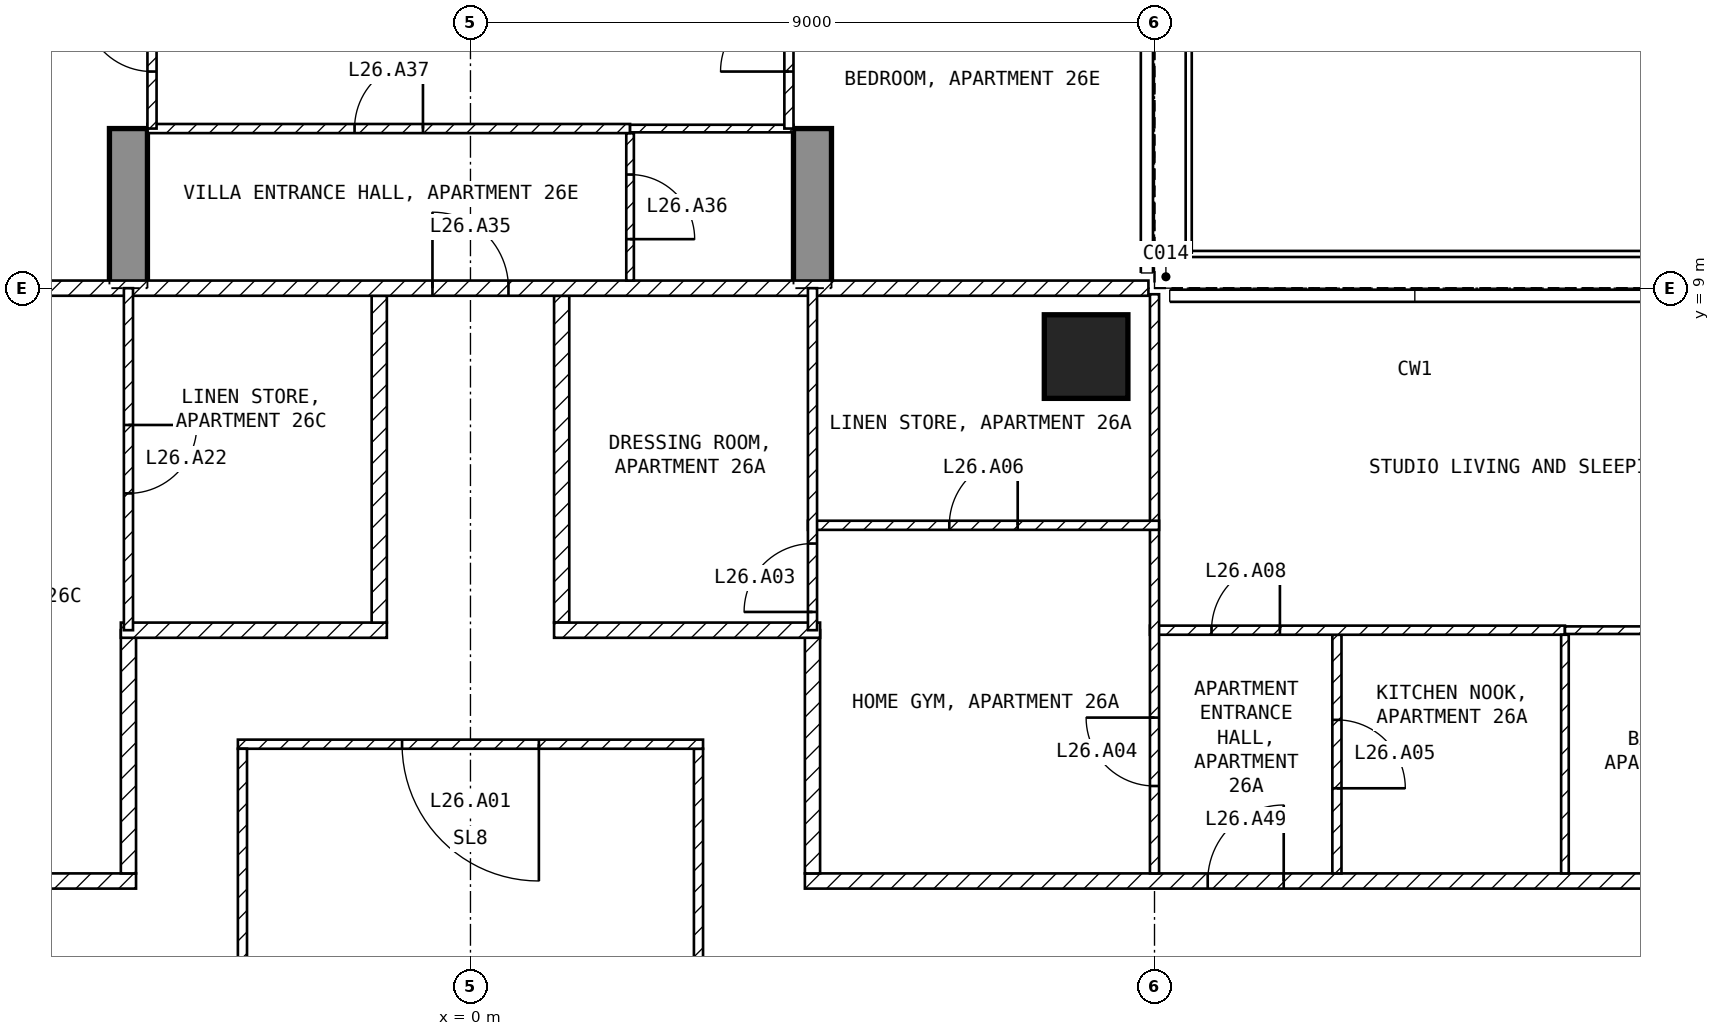
"""IFC4 building model, lengths in metres.
Left out: names, types, materials, properties, quantities, classifications, styles, units other than length and angle.
Written with IfcOpenShell. Run it as: python <this file> out.ifc"""

import sys

from ifc_helpers import new_model, si_unit, direction, frame, frame_2d, origin, origin_2d, place, context, subcontext, project, spatial, polyline, rectangle, outline, extrude, element, fill, save


model = new_model("IFC4")
c1 = context("Model", 3, precision=1e-05, world=origin(), true_north=direction((0.0, 1.0)))
c2 = subcontext(c1, "Body", "Model", "MODEL_VIEW")
j1 = project(units=[si_unit("LENGTHUNIT", "METRE"), si_unit("PLANEANGLEUNIT", "RADIAN")], contexts=[c1])
p1 = place(None, origin())
s1 = spatial("IfcSite", under=j1, at=p1, CompositionType="ELEMENT")
p2 = place(p1, origin())
s2 = spatial("IfcBuilding", under=s1, at=p2, CompositionType="ELEMENT")
p3 = place(p2, frame((0.0, 0.0, 112.9)))
s3 = spatial("IfcBuildingStorey", under=s2, at=p3, CompositionType="ELEMENT", Elevation=112.9)
p4 = place(p3, frame((8.1, 8.1, -0.25), z_axis=(0.0, 0.0, 1.0), x_axis=(1.0, 0.0, 0.0)))
e1 = element("IfcColumn", 1, at=p4, inside=s3, PredefinedType="COLUMN", context=c2, shape_type="SweptSolid", body=[
    extrude(rectangle(XDim=1.1, YDim=1.1, at=origin_2d()), origin(), (0.0, 0.0, 1.0), 3.5),
])
for number, where, z_axis, x_axis in (
    (2, (-4.75, 9.0, -0.25), (1.0, 0.0, 0.0), (0.0, 1.0, 0.0)),
    (3, (4.25, 9.0, -0.25), (1.0, 0.0, 0.0), (0.0, 1.0, 0.0)),
):
    element("IfcWall", number, at=place(p3, frame(where, z_axis=z_axis, x_axis=x_axis)), inside=s3, PredefinedType="SHEAR", context=c2, shape_type="SweptSolid", body=[
        extrude(outline(polyline([(0.0, 0.0), (2.1, 0.0), (2.1, 2.65), (4.5, 2.65), (4.5, 0.0), (9.9, 0.0), (9.9, 2.65), (12.3, 2.65), (12.3, 0.0), (16.55, 0.0), (16.55, 3.5), (0.0, 3.5), (0.0, 0.0)])), origin(), (0.0, 0.0, 1.0), 0.5),
    ])
p5 = place(p3, frame((3.0, -2.94, 0.0), z_axis=(0.0, 0.0, 1.0), x_axis=(0.0, 1.0, 0.0)))
e4 = element("IfcWall", 4, at=p5, inside=s3, PredefinedType="PARTITIONING", context=c2, shape_type="SweptSolid", body=[
    extrude(rectangle(XDim=5.88, YDim=0.12, at=frame_2d((2.94, 0.0))), origin(), (0.0, 0.0, 1.0), 3.25),
])
p6 = place(p3, frame((3.06, 3.0, 0.0), z_axis=(0.0, 0.0, 1.0), x_axis=(-1.0, 0.0, 0.0)))
e5 = element("IfcWall", 5, at=p6, inside=s3, PredefinedType="PARTITIONING", context=c2, shape_type="SweptSolid", body=[
    extrude(rectangle(XDim=6.12, YDim=0.12, at=frame_2d((3.06, 0.0))), origin(), (0.0, 0.0, 1.0), 3.25),
])
p7 = place(p6, frame((2.16, 0.0, 0.0)))
e6 = element("IfcOpeningElement", 6, at=p7, cuts=e5, PredefinedType="OPENING", context=c2, shape_type="SweptSolid", body=[
    extrude(rectangle(XDim=1.8, YDim=2.1, at=frame_2d((0.9, 1.05))), frame((0.0, 0.07, 0.0), z_axis=(0.0, -1.0, 0.0), x_axis=(1.0, 0.0, 0.0)), (0.0, 0.0, 1.0), 0.14),
])
p8 = place(p3, frame((-3.0, 2.94, 0.0), z_axis=(0.0, 0.0, 1.0), x_axis=(0.0, -1.0, 0.0)))
e7 = element("IfcWall", 7, at=p8, inside=s3, PredefinedType="PARTITIONING", context=c2, shape_type="SweptSolid", body=[
    extrude(rectangle(XDim=5.88, YDim=0.12, at=frame_2d((2.94, 0.0))), origin(), (0.0, 0.0, 1.0), 3.25),
])
p9 = place(p3, frame((4.4, 1.2, 0.0), z_axis=(0.0, 0.0, 1.0), x_axis=(1.0, 0.0, 0.0)))
e8 = element("IfcWall", 8, at=p9, inside=s3, PredefinedType="PARTITIONING", context=c2, shape_type="SweptSolid", body=[
    extrude(rectangle(XDim=17.2, YDim=0.2, at=frame_2d((8.6, 0.0))), origin(), (0.0, 0.0, 1.0), 3.25),
])
p10 = place(p9, frame((5.3, 0.0, 0.0)))
e9 = element("IfcOpeningElement", 9, at=p10, cuts=e8, PredefinedType="OPENING", context=c2, shape_type="SweptSolid", body=[
    extrude(rectangle(XDim=1.0, YDim=2.1, at=frame_2d((0.5, 1.05))), frame((0.0, 0.11, 0.0), z_axis=(0.0, -1.0, 0.0), x_axis=(1.0, 0.0, 0.0)), (0.0, 0.0, 1.0), 0.22),
])
p11 = place(p3, frame((4.5, 4.5, 0.0), z_axis=(0.0, 0.0, 1.0), x_axis=(0.0, -1.0, 0.0)))
e10 = element("IfcWall", 10, at=p11, inside=s3, PredefinedType="PARTITIONING", context=c2, shape_type="SweptSolid", body=[
    extrude(rectangle(XDim=3.2, YDim=0.2, at=frame_2d((1.6, 0.0))), origin(), (0.0, 0.0, 1.0), 3.25),
])
p12 = place(p3, frame((1.2, 8.9, 0.0), z_axis=(0.0, 0.0, 1.0), x_axis=(0.0, -1.0, 0.0)))
e11 = element("IfcWall", 11, at=p12, inside=s3, PredefinedType="PARTITIONING", context=c2, shape_type="SweptSolid", body=[
    extrude(rectangle(XDim=4.3, YDim=0.2, at=frame_2d((2.15, 0.0))), origin(), (0.0, 0.0, 1.0), 3.25),
])
p13 = place(p3, frame((1.1, 4.5, 0.0), z_axis=(0.0, 0.0, 1.0), x_axis=(1.0, 0.0, 0.0)))
e12 = element("IfcWall", 12, at=p13, inside=s3, PredefinedType="PARTITIONING", context=c2, shape_type="SweptSolid", body=[
    extrude(rectangle(XDim=3.5, YDim=0.2, at=frame_2d((1.75, 0.0))), origin(), (0.0, 0.0, 1.0), 3.25),
])
p14 = place(p3, frame((-21.6, 1.2, 0.0), z_axis=(0.0, 0.0, 1.0), x_axis=(1.0, 0.0, 0.0)))
e13 = element("IfcWall", 13, at=p14, inside=s3, PredefinedType="PARTITIONING", context=c2, shape_type="SweptSolid", body=[
    extrude(rectangle(XDim=17.2, YDim=0.2, at=frame_2d((8.6, 0.0))), origin(), (0.0, 0.0, 1.0), 3.25),
])
p15 = place(p14, frame((4.3, 0.0, 0.0)))
e14 = element("IfcOpeningElement", 14, at=p15, cuts=e13, PredefinedType="OPENING", context=c2, shape_type="SweptSolid", body=[
    extrude(rectangle(XDim=1.0, YDim=2.1, at=frame_2d((0.5, 1.05))), frame((0.0, 0.11, 0.0), z_axis=(0.0, -1.0, 0.0), x_axis=(1.0, 0.0, 0.0)), (0.0, 0.0, 1.0), 0.22),
])
p16 = place(p3, frame((-4.5, 1.3, 0.0), z_axis=(0.0, 0.0, 1.0), x_axis=(0.0, 1.0, 0.0)))
e15 = element("IfcWall", 15, at=p16, inside=s3, PredefinedType="PARTITIONING", context=c2, shape_type="SweptSolid", body=[
    extrude(rectangle(XDim=3.2, YDim=0.2, at=frame_2d((1.6, 0.0))), origin(), (0.0, 0.0, 1.0), 3.25),
])
p17 = place(p3, frame((-4.6, 4.5, 0.0), z_axis=(0.0, 0.0, 1.0), x_axis=(1.0, 0.0, 0.0)))
e16 = element("IfcWall", 16, at=p17, inside=s3, PredefinedType="PARTITIONING", context=c2, shape_type="SweptSolid", body=[
    extrude(rectangle(XDim=3.5, YDim=0.2, at=frame_2d((1.75, 0.0))), origin(), (0.0, 0.0, 1.0), 3.25),
])
p18 = place(p3, frame((-1.2, 4.6, 0.0), z_axis=(0.0, 0.0, 1.0), x_axis=(0.0, 1.0, 0.0)))
e17 = element("IfcWall", 17, at=p18, inside=s3, PredefinedType="PARTITIONING", context=c2, shape_type="SweptSolid", body=[
    extrude(rectangle(XDim=4.3, YDim=0.2, at=frame_2d((2.15, 0.0))), origin(), (0.0, 0.0, 1.0), 3.25),
])
p19 = place(p3, frame((-8.92, 9.0, 0.0), z_axis=(0.0, 0.0, 1.0), x_axis=(1.0, 0.0, 0.0)))
e18 = element("IfcWall", 18, at=p19, inside=s3, PredefinedType="PARTITIONING", context=c2, shape_type="SweptSolid", body=[
    extrude(rectangle(XDim=17.84, YDim=0.2, at=frame_2d((8.92, 0.0))), origin(), (0.0, 0.0, 1.0), 3.25),
])
p20 = place(p19, frame((8.42, 0.0, 0.0)))
e19 = element("IfcOpeningElement", 19, at=p20, cuts=e18, PredefinedType="OPENING", context=c2, shape_type="SweptSolid", body=[
    extrude(rectangle(XDim=1.0, YDim=2.1, at=frame_2d((0.5, 1.05))), frame((0.0, 0.11, 0.0), z_axis=(0.0, -1.0, 0.0), x_axis=(1.0, 0.0, 0.0)), (0.0, 0.0, 1.0), 0.22),
])
p21 = place(p3, frame((11.4, 4.44, 0.0), z_axis=(0.0, 0.0, 1.0), x_axis=(0.0, -1.0, 0.0)))
e20 = element("IfcWall", 20, at=p21, inside=s3, PredefinedType="PARTITIONING", context=c2, shape_type="SweptSolid", body=[
    extrude(rectangle(XDim=3.14, YDim=0.12, at=frame_2d((1.57, 0.0))), origin(), (0.0, 0.0, 1.0), 3.25),
])
p22 = place(p21, frame((1.12, 0.0, 0.0)))
e21 = element("IfcOpeningElement", 21, at=p22, cuts=e20, PredefinedType="OPENING", context=c2, shape_type="SweptSolid", body=[
    extrude(rectangle(XDim=0.9, YDim=2.1, at=frame_2d((0.45, 1.05))), frame((0.0, 0.07, 0.0), z_axis=(0.0, -1.0, 0.0), x_axis=(1.0, 0.0, 0.0)), (0.0, 0.0, 1.0), 0.14),
])
p23 = place(p3, frame((8.94, 4.5, 0.0), z_axis=(0.0, 0.0, 1.0), x_axis=(1.0, 0.0, 0.0)))
e22 = element("IfcWall", 22, at=p23, inside=s3, PredefinedType="PARTITIONING", context=c2, shape_type="SweptSolid", body=[
    extrude(rectangle(XDim=5.46, YDim=0.12, at=frame_2d((2.73, 0.0))), origin(), (0.0, 0.0, 1.0), 3.25),
])
p24 = place(p23, frame((0.81, 0.0, 0.0)))
e23 = element("IfcOpeningElement", 23, at=p24, cuts=e22, PredefinedType="OPENING", context=c2, shape_type="SweptSolid", body=[
    extrude(rectangle(XDim=0.9, YDim=2.1, at=frame_2d((0.45, 1.05))), frame((0.0, 0.07, 0.0), z_axis=(0.0, -1.0, 0.0), x_axis=(1.0, 0.0, 0.0)), (0.0, 0.0, 1.0), 0.14),
])
p25 = place(p3, frame((9.0, 1.3, 0.0), z_axis=(0.0, 0.0, 1.0), x_axis=(0.0, 1.0, 0.0)))
e24 = element("IfcWall", 24, at=p25, inside=s3, PredefinedType="PARTITIONING", context=c2, shape_type="SweptSolid", body=[
    extrude(rectangle(XDim=7.62, YDim=0.12, at=frame_2d((3.81, 0.0))), origin(), (0.0, 0.0, 1.0), 3.25),
])
p26 = place(p25, frame((1.15, 0.0, 0.0)))
e25 = element("IfcOpeningElement", 25, at=p26, cuts=e24, PredefinedType="OPENING", context=c2, shape_type="SweptSolid", body=[
    extrude(rectangle(XDim=0.9, YDim=2.1, at=frame_2d((0.45, 1.05))), frame((0.0, 0.07, 0.0), z_axis=(0.0, -1.0, 0.0), x_axis=(1.0, 0.0, 0.0)), (0.0, 0.0, 1.0), 0.14),
])
p27 = place(p3, frame((14.4, 4.44, 0.0), z_axis=(0.0, 0.0, 1.0), x_axis=(0.0, -1.0, 0.0)))
e26 = element("IfcWall", 26, at=p27, inside=s3, PredefinedType="PARTITIONING", context=c2, shape_type="SweptSolid", body=[
    extrude(rectangle(XDim=3.14, YDim=0.1, at=frame_2d((1.57, 0.0))), origin(), (0.0, 0.0, 1.0), 3.25),
])
p28 = place(p3, frame((14.4, 4.5, 0.0), z_axis=(0.0, 0.0, 1.0), x_axis=(1.0, 0.0, 0.0)))
e27 = element("IfcWall", 27, at=p28, inside=s3, PredefinedType="PARTITIONING", context=c2, shape_type="SweptSolid", body=[
    extrude(rectangle(XDim=3.0, YDim=0.1, at=frame_2d((1.5, 0.0))), origin(), (0.0, 0.0, 1.0), 3.25),
])
p29 = place(p28, frame((1.075, 0.0, 0.0)))
e28 = element("IfcOpeningElement", 28, at=p29, cuts=e27, PredefinedType="OPENING", context=c2, shape_type="SweptSolid", body=[
    extrude(rectangle(XDim=0.85, YDim=2.1, at=frame_2d((0.425, 1.05))), frame((0.0, 0.06, 0.0), z_axis=(0.0, -1.0, 0.0), x_axis=(1.0, 0.0, 0.0)), (0.0, 0.0, 1.0), 0.12),
])
p30 = place(p3, frame((4.44, 5.88, 0.0), z_axis=(0.0, 0.0, 1.0), x_axis=(1.0, 0.0, 0.0)))
e29 = element("IfcWall", 29, at=p30, inside=s3, PredefinedType="PARTITIONING", context=c2, shape_type="SweptSolid", body=[
    extrude(rectangle(XDim=4.62, YDim=0.12, at=frame_2d((2.31, 0.0))), origin(), (0.0, 0.0, 1.0), 3.25),
])
p31 = place(p30, frame((1.86, 0.0, 0.0)))
e30 = element("IfcOpeningElement", 30, at=p31, cuts=e29, PredefinedType="OPENING", context=c2, shape_type="SweptSolid", body=[
    extrude(rectangle(XDim=0.9, YDim=2.1, at=frame_2d((0.45, 1.05))), frame((0.0, 0.07, 0.0), z_axis=(0.0, -1.0, 0.0), x_axis=(1.0, 0.0, 0.0)), (0.0, 0.0, 1.0), 0.14),
])
p32 = place(p3, frame((4.5, 4.5, 0.0), z_axis=(0.0, 0.0, 1.0), x_axis=(0.0, 1.0, 0.0)))
e31 = element("IfcWall", 31, at=p32, inside=s3, PredefinedType="PARTITIONING", context=c2, shape_type="SweptSolid", body=[
    extrude(rectangle(XDim=4.5, YDim=0.12, at=frame_2d((2.25, 0.0))), origin(), (0.0, 0.0, 1.0), 3.25),
])
p33 = place(p32, frame((0.24, 0.0, 0.0)))
e32 = element("IfcOpeningElement", 32, at=p33, cuts=e31, PredefinedType="OPENING", context=c2, shape_type="SweptSolid", body=[
    extrude(rectangle(XDim=0.9, YDim=2.1, at=frame_2d((0.45, 1.05))), frame((0.0, 0.07, 0.0), z_axis=(0.0, -1.0, 0.0), x_axis=(1.0, 0.0, 0.0)), (0.0, 0.0, 1.0), 0.14),
])
p34 = place(p3, frame((-4.5, 9.0, 0.0), z_axis=(0.0, 0.0, 1.0), x_axis=(0.0, -1.0, 0.0)))
e33 = element("IfcWall", 33, at=p34, inside=s3, PredefinedType="PARTITIONING", context=c2, shape_type="SweptSolid", body=[
    extrude(rectangle(XDim=4.5, YDim=0.12, at=frame_2d((2.25, 0.0))), origin(), (0.0, 0.0, 1.0), 3.25),
])
p35 = place(p34, frame((1.8, 0.0, 0.0)))
e34 = element("IfcOpeningElement", 34, at=p35, cuts=e33, PredefinedType="OPENING", context=c2, shape_type="SweptSolid", body=[
    extrude(rectangle(XDim=0.9, YDim=2.1, at=frame_2d((0.45, 1.05))), frame((0.0, 0.07, 0.0), z_axis=(0.0, -1.0, 0.0), x_axis=(1.0, 0.0, 0.0)), (0.0, 0.0, 1.0), 0.14),
])
p36 = place(p3, frame((2.1, 11.04, 0.0), z_axis=(0.0, 0.0, 1.0), x_axis=(0.0, -1.0, 0.0)))
e35 = element("IfcWall", 35, at=p36, inside=s3, PredefinedType="PARTITIONING", context=c2, shape_type="SweptSolid", body=[
    extrude(rectangle(XDim=1.94, YDim=0.1, at=frame_2d((0.97, 0.0))), origin(), (0.0, 0.0, 1.0), 3.25),
])
p37 = place(p36, frame((0.545, 0.0, 0.0)))
e36 = element("IfcOpeningElement", 36, at=p37, cuts=e35, PredefinedType="OPENING", context=c2, shape_type="SweptSolid", body=[
    extrude(rectangle(XDim=0.85, YDim=2.1, at=frame_2d((0.425, 1.05))), frame((0.0, 0.06, 0.0), z_axis=(0.0, -1.0, 0.0), x_axis=(1.0, 0.0, 0.0)), (0.0, 0.0, 1.0), 0.12),
])
p38 = place(p3, frame((-4.25, 11.1, 0.0), z_axis=(0.0, 0.0, 1.0), x_axis=(1.0, 0.0, 0.0)))
e37 = element("IfcWall", 37, at=p38, inside=s3, PredefinedType="PARTITIONING", context=c2, shape_type="SweptSolid", body=[
    extrude(rectangle(XDim=6.35, YDim=0.12, at=frame_2d((3.175, 0.0))), origin(), (0.0, 0.0, 1.0), 3.25),
])
p39 = place(p38, frame((2.725, 0.0, 0.0)))
e38 = element("IfcOpeningElement", 38, at=p39, cuts=e37, PredefinedType="OPENING", context=c2, shape_type="SweptSolid", body=[
    extrude(rectangle(XDim=0.9, YDim=2.1, at=frame_2d((0.45, 1.05))), frame((0.0, 0.07, 0.0), z_axis=(0.0, -1.0, 0.0), x_axis=(1.0, 0.0, 0.0)), (0.0, 0.0, 1.0), 0.14),
])
p40 = place(p3, frame((2.1, 11.1, 0.0), z_axis=(0.0, 0.0, 1.0), x_axis=(1.0, 0.0, 0.0)))
e39 = element("IfcWall", 39, at=p40, inside=s3, PredefinedType="PARTITIONING", context=c2, shape_type="SweptSolid", body=[
    extrude(rectangle(XDim=2.15, YDim=0.1, at=frame_2d((1.075, 0.0))), origin(), (0.0, 0.0, 1.0), 3.25),
])
p41 = place(p3, frame((4.19, 11.1, 0.0), z_axis=(0.0, 0.0, 1.0), x_axis=(0.0, 1.0, 0.0)))
e40 = element("IfcWall", 40, at=p41, inside=s3, PredefinedType="PARTITIONING", context=c2, shape_type="SweptSolid", body=[
    extrude(rectangle(XDim=2.4, YDim=0.12, at=frame_2d((1.2, 0.0))), origin(), (0.0, 0.0, 1.0), 2.4),
])
p42 = place(p41, frame((0.75, 0.0, 0.0)))
e41 = element("IfcOpeningElement", 41, at=p42, cuts=e40, PredefinedType="OPENING", context=c2, shape_type="SweptSolid", body=[
    extrude(rectangle(XDim=0.9, YDim=2.1, at=frame_2d((0.45, 1.05))), frame((0.0, 0.07, 0.0), z_axis=(0.0, -1.0, 0.0), x_axis=(1.0, 0.0, 0.0)), (0.0, 0.0, 1.0), 0.14),
])
p43 = place(p3, frame((-4.19, 11.1, 0.0), z_axis=(0.0, 0.0, 1.0), x_axis=(0.0, 1.0, 0.0)))
e42 = element("IfcWall", 42, at=p43, inside=s3, PredefinedType="PARTITIONING", context=c2, shape_type="SweptSolid", body=[
    extrude(rectangle(XDim=2.4, YDim=0.12, at=frame_2d((1.2, 0.0))), origin(), (0.0, 0.0, 1.0), 2.4),
])
p44 = place(p43, frame((0.75, 0.0, 0.0)))
e43 = element("IfcOpeningElement", 43, at=p44, cuts=e42, PredefinedType="OPENING", context=c2, shape_type="SweptSolid", body=[
    extrude(rectangle(XDim=0.9, YDim=2.1, at=frame_2d((0.45, 1.05))), frame((0.0, 0.07, 0.0), z_axis=(0.0, -1.0, 0.0), x_axis=(1.0, 0.0, 0.0)), (0.0, 0.0, 1.0), 0.14),
])
p45 = place(p7, origin())
e44 = element("IfcDoor", 44, at=p45, inside=s3, OperationType="SINGLE_SWING_LEFT", PredefinedType="DOOR", context=c2, shape_type="SweptSolid", body=[
    extrude(rectangle(XDim=1.8, YDim=2.1, at=frame_2d((0.9, 1.05))), frame((0.0, 0.025, 0.0), z_axis=(0.0, -1.0, 0.0), x_axis=(1.0, 0.0, 0.0)), (0.0, 0.0, 1.0), 0.05),
])
fill(e6, e44)
p46 = place(p33, origin())
e45 = element("IfcDoor", 45, at=p46, inside=s3, OperationType="SINGLE_SWING_LEFT", PredefinedType="DOOR", context=c2, shape_type="SweptSolid", body=[
    extrude(rectangle(XDim=0.9, YDim=2.1, at=frame_2d((0.45, 1.05))), frame((0.0, 0.025, 0.0), z_axis=(0.0, -1.0, 0.0), x_axis=(1.0, 0.0, 0.0)), (0.0, 0.0, 1.0), 0.05),
])
fill(e32, e45)
p47 = place(p26, origin())
e46 = element("IfcDoor", 46, at=p47, inside=s3, OperationType="SINGLE_SWING_RIGHT", PredefinedType="DOOR", context=c2, shape_type="SweptSolid", body=[
    extrude(rectangle(XDim=0.9, YDim=2.1, at=frame_2d((0.45, 1.05))), frame((0.0, 0.025, 0.0), z_axis=(0.0, -1.0, 0.0), x_axis=(1.0, 0.0, 0.0)), (0.0, 0.0, 1.0), 0.05),
])
fill(e25, e46)
p48 = place(p22, origin())
e47 = element("IfcDoor", 47, at=p48, inside=s3, OperationType="SINGLE_SWING_RIGHT", PredefinedType="DOOR", context=c2, shape_type="SweptSolid", body=[
    extrude(rectangle(XDim=0.9, YDim=2.1, at=frame_2d((0.45, 1.05))), frame((0.0, 0.025, 0.0), z_axis=(0.0, -1.0, 0.0), x_axis=(1.0, 0.0, 0.0)), (0.0, 0.0, 1.0), 0.05),
])
fill(e21, e47)
p49 = place(p31, origin())
e48 = element("IfcDoor", 48, at=p49, inside=s3, OperationType="SINGLE_SWING_RIGHT", PredefinedType="DOOR", context=c2, shape_type="SweptSolid", body=[
    extrude(rectangle(XDim=0.9, YDim=2.1, at=frame_2d((0.45, 1.05))), frame((0.0, 0.025, 0.0), z_axis=(0.0, -1.0, 0.0), x_axis=(1.0, 0.0, 0.0)), (0.0, 0.0, 1.0), 0.05),
])
fill(e30, e48)
p50 = place(p24, origin())
e49 = element("IfcDoor", 49, at=p50, inside=s3, OperationType="SINGLE_SWING_RIGHT", PredefinedType="DOOR", context=c2, shape_type="SweptSolid", body=[
    extrude(rectangle(XDim=0.9, YDim=2.1, at=frame_2d((0.45, 1.05))), frame((0.0, 0.025, 0.0), z_axis=(0.0, -1.0, 0.0), x_axis=(1.0, 0.0, 0.0)), (0.0, 0.0, 1.0), 0.05),
])
fill(e23, e49)
p51 = place(p35, origin())
e50 = element("IfcDoor", 50, at=p51, inside=s3, OperationType="SINGLE_SWING_LEFT", PredefinedType="DOOR", context=c2, shape_type="SweptSolid", body=[
    extrude(rectangle(XDim=0.9, YDim=2.1, at=frame_2d((0.45, 1.05))), frame((0.0, 0.025, 0.0), z_axis=(0.0, -1.0, 0.0), x_axis=(1.0, 0.0, 0.0)), (0.0, 0.0, 1.0), 0.05),
])
fill(e34, e50)
p52 = place(p20, origin())
e51 = element("IfcDoor", 51, at=p52, inside=s3, OperationType="SINGLE_SWING_LEFT", PredefinedType="DOOR", context=c2, shape_type="SweptSolid", body=[
    extrude(rectangle(XDim=1.0, YDim=2.1, at=frame_2d((0.5, 1.05))), frame((0.0, 0.025, 0.0), z_axis=(0.0, -1.0, 0.0), x_axis=(1.0, 0.0, 0.0)), (0.0, 0.0, 1.0), 0.05),
])
fill(e19, e51)
p53 = place(p37, origin())
e52 = element("IfcDoor", 52, at=p53, inside=s3, OperationType="SINGLE_SWING_RIGHT", PredefinedType="DOOR", context=c2, shape_type="SweptSolid", body=[
    extrude(rectangle(XDim=0.85, YDim=2.1, at=frame_2d((0.425, 1.05))), frame((0.0, 0.025, 0.0), z_axis=(0.0, -1.0, 0.0), x_axis=(1.0, 0.0, 0.0)), (0.0, 0.0, 1.0), 0.05),
])
fill(e36, e52)
p54 = place(p39, origin())
e53 = element("IfcDoor", 53, at=p54, inside=s3, OperationType="SINGLE_SWING_RIGHT", PredefinedType="DOOR", context=c2, shape_type="SweptSolid", body=[
    extrude(rectangle(XDim=0.9, YDim=2.1, at=frame_2d((0.45, 1.05))), frame((0.0, 0.025, 0.0), z_axis=(0.0, -1.0, 0.0), x_axis=(1.0, 0.0, 0.0)), (0.0, 0.0, 1.0), 0.05),
])
fill(e38, e53)
p55 = place(p10, origin())
e54 = element("IfcDoor", 54, at=p55, inside=s3, OperationType="SINGLE_SWING_RIGHT", PredefinedType="DOOR", context=c2, shape_type="SweptSolid", body=[
    extrude(rectangle(XDim=1.0, YDim=2.1, at=frame_2d((0.5, 1.05))), frame((0.0, 0.025, 0.0), z_axis=(0.0, -1.0, 0.0), x_axis=(1.0, 0.0, 0.0)), (0.0, 0.0, 1.0), 0.05),
])
fill(e9, e54)
p56 = place(p42, origin())
e55 = element("IfcDoor", 55, at=p56, inside=s3, OperationType="SINGLE_SWING_LEFT", PredefinedType="DOOR", context=c2, shape_type="SweptSolid", body=[
    extrude(rectangle(XDim=0.9, YDim=2.1, at=frame_2d((0.45, 1.05))), frame((0.0, 0.025, 0.0), z_axis=(0.0, -1.0, 0.0), x_axis=(1.0, 0.0, 0.0)), (0.0, 0.0, 1.0), 0.05),
])
fill(e41, e55)
p57 = place(p44, origin())
e56 = element("IfcDoor", 56, at=p57, inside=s3, OperationType="SINGLE_SWING_RIGHT", PredefinedType="DOOR", context=c2, shape_type="SweptSolid", body=[
    extrude(rectangle(XDim=0.9, YDim=2.1, at=frame_2d((0.45, 1.05))), frame((0.0, 0.025, 0.0), z_axis=(0.0, -1.0, 0.0), x_axis=(1.0, 0.0, 0.0)), (0.0, 0.0, 1.0), 0.05),
])
fill(e43, e56)
save(model, sys.argv[1])
